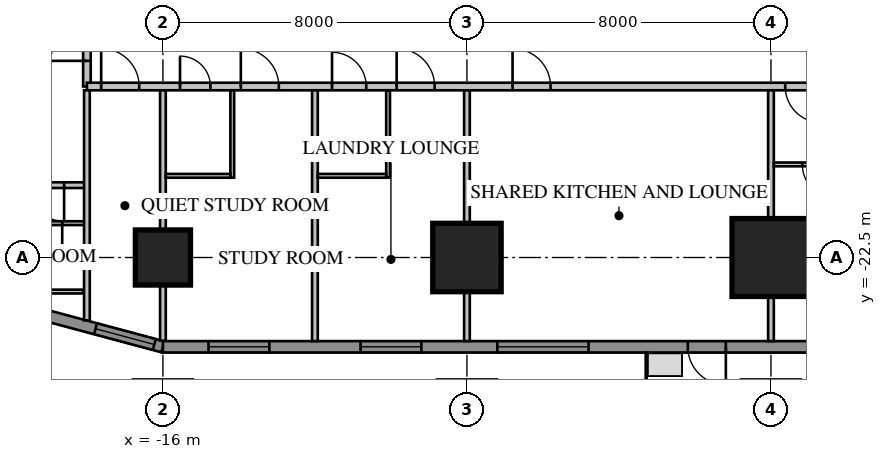
"""IFC4 building model, lengths in metres.
Left out: names, types, materials, properties, quantities, classifications, styles, units other than length and angle.
Written with IfcOpenShell. Run it as: python <this file> out.ifc"""

import sys

from ifc_helpers import new_model, si_unit, direction, frame, frame_2d, origin, origin_2d, place, context, subcontext, project, spatial, rectangle, extrude, element, fill, save


model = new_model("IFC4")
c1 = context("Model", 3, precision=1e-05, world=origin(), true_north=direction((0.0, 1.0)))
c2 = subcontext(c1, "Body", "Model", "MODEL_VIEW")
j1 = project(units=[si_unit("LENGTHUNIT", "METRE"), si_unit("PLANEANGLEUNIT", "RADIAN")], contexts=[c1])
p1 = place(None, origin())
s1 = spatial("IfcSite", under=j1, at=p1, CompositionType="ELEMENT")
p2 = place(p1, origin())
s2 = spatial("IfcBuilding", under=s1, at=p2, CompositionType="ELEMENT")
p3 = place(p2, frame((0.0, 0.0, 31.4)))
s3 = spatial("IfcBuildingStorey", under=s2, at=p3, CompositionType="ELEMENT", Elevation=31.4)
p4 = place(p3, frame((-16.0, -22.5, 0.0), z_axis=(0.0, 0.0, 1.0), x_axis=(1.0, 0.0, 0.0)))
e1 = element("IfcColumn", 1, at=p4, inside=s3, PredefinedType="COLUMN", context=c2, shape_type="SweptSolid", body=[
    extrude(rectangle(XDim=1.45, YDim=1.45, at=origin_2d()), origin(), (0.0, 0.0, 1.0), 3.85),
])
p5 = place(p3, frame((-8.0, -22.5, 0.0), z_axis=(0.0, 0.0, 1.0), x_axis=(1.0, 0.0, 0.0)))
e2 = element("IfcColumn", 2, at=p5, inside=s3, PredefinedType="COLUMN", context=c2, shape_type="SweptSolid", body=[
    extrude(rectangle(XDim=1.8, YDim=1.8, at=origin_2d()), origin(), (0.0, 0.0, 1.0), 3.85),
])
p6 = place(p3, frame((0.0, -22.5, 0.0), z_axis=(0.0, 0.0, 1.0), x_axis=(1.0, 0.0, 0.0)))
e3 = element("IfcColumn", 3, at=p6, inside=s3, PredefinedType="COLUMN", context=c2, shape_type="SweptSolid", body=[
    extrude(rectangle(XDim=2.05, YDim=2.05, at=origin_2d()), origin(), (0.0, 0.0, 1.0), 3.85),
])
p7 = place(p3, frame((-20.425, -23.664, 0.0), z_axis=(0.0, 0.0, 1.0), x_axis=(0.965920218567, -0.258839972501, 0.0)))
e4 = element("IfcWall", 4, at=p7, inside=s3, PredefinedType="SOLIDWALL", context=c2, shape_type="SweptSolid", body=[
    extrude(rectangle(XDim=4.581, YDim=0.3, at=frame_2d((2.291, 0.0))), origin(), (0.0, 0.0, 1.0), 3.65),
])
p8 = place(p7, frame((2.746, 0.0, 0.75)))
e5 = element("IfcOpeningElement", 5, at=p8, cuts=e4, PredefinedType="OPENING", context=c2, shape_type="SweptSolid", body=[
    extrude(rectangle(XDim=1.6, YDim=1.8, at=frame_2d((0.8, 0.9))), frame((0.0, 0.17, 0.0), z_axis=(0.0, -1.0, 0.0), x_axis=(1.0, 0.0, 0.0)), (0.0, 0.0, 1.0), 0.34),
])
p9 = place(p3, frame((-16.0, -24.85, 0.0), z_axis=(0.0, 0.0, 1.0), x_axis=(1.0, 0.0, 0.0)))
e6 = element("IfcWall", 6, at=p9, inside=s3, PredefinedType="SOLIDWALL", context=c2, shape_type="SweptSolid", body=[
    extrude(rectangle(XDim=32.0, YDim=0.3, at=frame_2d((16.0, 0.0))), origin(), (0.0, 0.0, 1.0), 3.65),
])
p10 = place(p9, frame((1.2, 0.0, 0.75)))
e7 = element("IfcOpeningElement", 7, at=p10, cuts=e6, PredefinedType="OPENING", context=c2, shape_type="SweptSolid", body=[
    extrude(rectangle(XDim=1.6, YDim=1.8, at=frame_2d((0.8, 0.9))), frame((0.0, 0.17, 0.0), z_axis=(0.0, -1.0, 0.0), x_axis=(1.0, 0.0, 0.0)), (0.0, 0.0, 1.0), 0.34),
])
p11 = place(p9, frame((5.2, 0.0, 0.75)))
e8 = element("IfcOpeningElement", 8, at=p11, cuts=e6, PredefinedType="OPENING", context=c2, shape_type="SweptSolid", body=[
    extrude(rectangle(XDim=1.6, YDim=1.8, at=frame_2d((0.8, 0.9))), frame((0.0, 0.17, 0.0), z_axis=(0.0, -1.0, 0.0), x_axis=(1.0, 0.0, 0.0)), (0.0, 0.0, 1.0), 0.34),
])
p12 = place(p9, frame((17.2, 0.0, 0.75)))
e9 = element("IfcOpeningElement", 9, at=p12, cuts=e6, PredefinedType="OPENING", context=c2, shape_type="SweptSolid", body=[
    extrude(rectangle(XDim=1.6, YDim=1.8, at=frame_2d((0.8, 0.9))), frame((0.0, 0.17, 0.0), z_axis=(0.0, -1.0, 0.0), x_axis=(1.0, 0.0, 0.0)), (0.0, 0.0, 1.0), 0.34),
])
p13 = place(p9, frame((21.2, 0.0, 0.75)))
e10 = element("IfcOpeningElement", 10, at=p13, cuts=e6, PredefinedType="OPENING", context=c2, shape_type="SweptSolid", body=[
    extrude(rectangle(XDim=1.6, YDim=1.8, at=frame_2d((0.8, 0.9))), frame((0.0, 0.17, 0.0), z_axis=(0.0, -1.0, 0.0), x_axis=(1.0, 0.0, 0.0)), (0.0, 0.0, 1.0), 0.34),
])
p14 = place(p9, frame((25.2, 0.0, 0.75)))
e11 = element("IfcOpeningElement", 11, at=p14, cuts=e6, PredefinedType="OPENING", context=c2, shape_type="SweptSolid", body=[
    extrude(rectangle(XDim=1.6, YDim=1.8, at=frame_2d((0.8, 0.9))), frame((0.0, 0.17, 0.0), z_axis=(0.0, -1.0, 0.0), x_axis=(1.0, 0.0, 0.0)), (0.0, 0.0, 1.0), 0.34),
])
p15 = place(p9, frame((29.2, 0.0, 0.75)))
e12 = element("IfcOpeningElement", 12, at=p15, cuts=e6, PredefinedType="OPENING", context=c2, shape_type="SweptSolid", body=[
    extrude(rectangle(XDim=1.6, YDim=1.8, at=frame_2d((0.8, 0.9))), frame((0.0, 0.17, 0.0), z_axis=(0.0, -1.0, 0.0), x_axis=(1.0, 0.0, 0.0)), (0.0, 0.0, 1.0), 0.34),
])
p16 = place(p9, frame((8.8, 0.0, 0.75)))
e13 = element("IfcOpeningElement", 13, at=p16, cuts=e6, PredefinedType="OPENING", context=c2, shape_type="SweptSolid", body=[
    extrude(rectangle(XDim=2.4, YDim=1.8, at=frame_2d((1.2, 0.9))), frame((0.0, 0.17, 0.0), z_axis=(0.0, -1.0, 0.0), x_axis=(1.0, 0.0, 0.0)), (0.0, 0.0, 1.0), 0.34),
])
p17 = place(p9, frame((13.812, 0.0, 0.0)))
e14 = element("IfcOpeningElement", 14, at=p17, cuts=e6, PredefinedType="OPENING", context=c2, shape_type="SweptSolid", body=[
    extrude(rectangle(XDim=1.0, YDim=2.4, at=frame_2d((0.5, 1.2))), frame((0.0, 0.17, 0.0), z_axis=(0.0, -1.0, 0.0), x_axis=(1.0, 0.0, 0.0)), (0.0, 0.0, 1.0), 0.34),
])
p18 = place(p3, frame((-18.0, 18.0, 0.0), z_axis=(0.0, 0.0, 1.0), x_axis=(0.0, -1.0, 0.0)))
e15 = element("IfcWall", 15, at=p18, inside=s3, PredefinedType="PARTITIONING", context=c2, shape_type="SweptSolid", body=[
    extrude(rectangle(XDim=36.0, YDim=0.2, at=frame_2d((18.0, 0.0))), origin(), (0.0, 0.0, 1.0), 3.65),
])
p19 = place(p18, frame((10.4, 0.0, 0.0)))
e16 = element("IfcOpeningElement", 16, at=p19, cuts=e15, PredefinedType="OPENING", context=c2, shape_type="SweptSolid", body=[
    extrude(rectangle(XDim=1.0, YDim=2.1, at=frame_2d((0.5, 1.05))), frame((0.0, 0.12, 0.0), z_axis=(0.0, -1.0, 0.0), x_axis=(1.0, 0.0, 0.0)), (0.0, 0.0, 1.0), 0.24),
])
p20 = place(p18, frame((0.375, 0.0, 0.0)))
e17 = element("IfcOpeningElement", 17, at=p20, cuts=e15, PredefinedType="OPENING", context=c2, shape_type="SweptSolid", body=[
    extrude(rectangle(XDim=1.0, YDim=2.1, at=frame_2d((0.5, 1.05))), frame((0.0, 0.12, 0.0), z_axis=(0.0, -1.0, 0.0), x_axis=(1.0, 0.0, 0.0)), (0.0, 0.0, 1.0), 0.24),
])
p21 = place(p18, frame((34.375, 0.0, 0.0)))
e18 = element("IfcOpeningElement", 18, at=p21, cuts=e15, PredefinedType="OPENING", context=c2, shape_type="SweptSolid", body=[
    extrude(rectangle(XDim=0.95, YDim=2.1, at=frame_2d((0.475, 1.05))), frame((0.0, 0.12, 0.0), z_axis=(0.0, -1.0, 0.0), x_axis=(1.0, 0.0, 0.0)), (0.0, 0.0, 1.0), 0.24),
])
p22 = place(p3, frame((-18.065, -21.596, 0.0), z_axis=(0.0, 0.0, 1.0), x_axis=(-1.0, 0.0, 0.0)))
e19 = element("IfcWall", 19, at=p22, inside=s3, PredefinedType="PARTITIONING", context=c2, shape_type="SweptSolid", body=[
    extrude(rectangle(XDim=2.335, YDim=0.1, at=frame_2d((1.167, 0.0))), origin(), (0.0, 0.0, 1.0), 3.65),
])
p23 = place(p22, frame((0.585, 0.0, 0.0)))
e20 = element("IfcOpeningElement", 20, at=p23, cuts=e19, PredefinedType="OPENING", context=c2, shape_type="SweptSolid", body=[
    extrude(rectangle(XDim=0.8, YDim=2.1, at=frame_2d((0.4, 1.05))), frame((0.0, 0.07, 0.0), z_axis=(0.0, -1.0, 0.0), x_axis=(1.0, 0.0, 0.0)), (0.0, 0.0, 1.0), 0.14),
])
p24 = place(p3, frame((-18.1, -23.396, 0.0), z_axis=(0.0, 0.0, 1.0), x_axis=(-1.0, 0.0, 0.0)))
e21 = element("IfcWall", 21, at=p24, inside=s3, PredefinedType="PARTITIONING", context=c2, shape_type="SweptSolid", body=[
    extrude(rectangle(XDim=2.3, YDim=0.1, at=frame_2d((1.15, 0.0))), origin(), (0.0, 0.0, 1.0), 3.65),
])
p25 = place(p3, frame((-18.065, -20.596, 0.0), z_axis=(0.0, 0.0, 1.0), x_axis=(-1.0, 0.0, 0.0)))
e22 = element("IfcWall", 22, at=p25, inside=s3, PredefinedType="PARTITIONING", context=c2, shape_type="SweptSolid", body=[
    extrude(rectangle(XDim=5.209, YDim=0.15, at=frame_2d((2.604, 0.0))), origin(), (0.0, 0.0, 1.0), 3.65),
])
p26 = place(p25, frame((0.535, 0.0, 0.0)))
e23 = element("IfcOpeningElement", 23, at=p26, cuts=e22, PredefinedType="OPENING", context=c2, shape_type="SweptSolid", body=[
    extrude(rectangle(XDim=0.95, YDim=2.1, at=frame_2d((0.475, 1.05))), frame((0.0, 0.095, 0.0), z_axis=(0.0, -1.0, 0.0), x_axis=(1.0, 0.0, 0.0)), (0.0, 0.0, 1.0), 0.19),
])
p27 = place(p3, frame((-18.0, -18.0, 0.0), z_axis=(0.0, 0.0, 1.0), x_axis=(1.0, 0.0, 0.0)))
e24 = element("IfcWall", 24, at=p27, inside=s3, PredefinedType="PARTITIONING", context=c2, shape_type="SweptSolid", body=[
    extrude(rectangle(XDim=36.0, YDim=0.2, at=frame_2d((18.0, 0.0))), origin(), (0.0, 0.0, 1.0), 3.65),
])
p28 = place(p27, frame((0.375, 0.0, 0.0)))
e25 = element("IfcOpeningElement", 25, at=p28, cuts=e24, PredefinedType="OPENING", context=c2, shape_type="SweptSolid", body=[
    extrude(rectangle(XDim=1.0, YDim=2.1, at=frame_2d((0.5, 1.05))), frame((0.0, 0.12, 0.0), z_axis=(0.0, -1.0, 0.0), x_axis=(1.0, 0.0, 0.0)), (0.0, 0.0, 1.0), 0.24),
])
p29 = place(p27, frame((2.45, 0.0, 0.0)))
e26 = element("IfcOpeningElement", 26, at=p29, cuts=e24, PredefinedType="OPENING", context=c2, shape_type="SweptSolid", body=[
    extrude(rectangle(XDim=0.8, YDim=2.1, at=frame_2d((0.4, 1.05))), frame((0.0, 0.12, 0.0), z_axis=(0.0, -1.0, 0.0), x_axis=(1.0, 0.0, 0.0)), (0.0, 0.0, 1.0), 0.24),
])
p30 = place(p27, frame((4.05, 0.0, 0.0)))
e27 = element("IfcOpeningElement", 27, at=p30, cuts=e24, PredefinedType="OPENING", context=c2, shape_type="SweptSolid", body=[
    extrude(rectangle(XDim=1.0, YDim=2.1, at=frame_2d((0.5, 1.05))), frame((0.0, 0.12, 0.0), z_axis=(0.0, -1.0, 0.0), x_axis=(1.0, 0.0, 0.0)), (0.0, 0.0, 1.0), 0.24),
])
p31 = place(p27, frame((6.45, 0.0, 0.0)))
e28 = element("IfcOpeningElement", 28, at=p31, cuts=e24, PredefinedType="OPENING", context=c2, shape_type="SweptSolid", body=[
    extrude(rectangle(XDim=0.9, YDim=2.1, at=frame_2d((0.45, 1.05))), frame((0.0, 0.12, 0.0), z_axis=(0.0, -1.0, 0.0), x_axis=(1.0, 0.0, 0.0)), (0.0, 0.0, 1.0), 0.24),
])
p32 = place(p27, frame((8.15, 0.0, 0.0)))
e29 = element("IfcOpeningElement", 29, at=p32, cuts=e24, PredefinedType="OPENING", context=c2, shape_type="SweptSolid", body=[
    extrude(rectangle(XDim=1.0, YDim=2.1, at=frame_2d((0.5, 1.05))), frame((0.0, 0.12, 0.0), z_axis=(0.0, -1.0, 0.0), x_axis=(1.0, 0.0, 0.0)), (0.0, 0.0, 1.0), 0.24),
])
p33 = place(p27, frame((18.375, 0.0, 0.0)))
e30 = element("IfcOpeningElement", 30, at=p33, cuts=e24, PredefinedType="OPENING", context=c2, shape_type="SweptSolid", body=[
    extrude(rectangle(XDim=0.95, YDim=2.1, at=frame_2d((0.475, 1.05))), frame((0.0, 0.12, 0.0), z_axis=(0.0, -1.0, 0.0), x_axis=(1.0, 0.0, 0.0)), (0.0, 0.0, 1.0), 0.24),
])
p34 = place(p27, frame((24.25, 0.0, 0.0)))
e31 = element("IfcOpeningElement", 31, at=p34, cuts=e24, PredefinedType="OPENING", context=c2, shape_type="SweptSolid", body=[
    extrude(rectangle(XDim=0.95, YDim=2.1, at=frame_2d((0.475, 1.05))), frame((0.0, 0.12, 0.0), z_axis=(0.0, -1.0, 0.0), x_axis=(1.0, 0.0, 0.0)), (0.0, 0.0, 1.0), 0.24),
])
p35 = place(p27, frame((26.375, 0.0, 0.0)))
e32 = element("IfcOpeningElement", 32, at=p35, cuts=e24, PredefinedType="OPENING", context=c2, shape_type="SweptSolid", body=[
    extrude(rectangle(XDim=0.95, YDim=2.1, at=frame_2d((0.475, 1.05))), frame((0.0, 0.12, 0.0), z_axis=(0.0, -1.0, 0.0), x_axis=(1.0, 0.0, 0.0)), (0.0, 0.0, 1.0), 0.24),
])
p36 = place(p27, frame((32.25, 0.0, 0.0)))
e33 = element("IfcOpeningElement", 33, at=p36, cuts=e24, PredefinedType="OPENING", context=c2, shape_type="SweptSolid", body=[
    extrude(rectangle(XDim=0.95, YDim=2.1, at=frame_2d((0.475, 1.05))), frame((0.0, 0.12, 0.0), z_axis=(0.0, -1.0, 0.0), x_axis=(1.0, 0.0, 0.0)), (0.0, 0.0, 1.0), 0.24),
])
p37 = place(p27, frame((34.375, 0.0, 0.0)))
e34 = element("IfcOpeningElement", 34, at=p37, cuts=e24, PredefinedType="OPENING", context=c2, shape_type="SweptSolid", body=[
    extrude(rectangle(XDim=0.95, YDim=2.1, at=frame_2d((0.475, 1.05))), frame((0.0, 0.12, 0.0), z_axis=(0.0, -1.0, 0.0), x_axis=(1.0, 0.0, 0.0)), (0.0, 0.0, 1.0), 0.24),
])
p38 = place(p27, frame((11.2, 0.0, 0.0)))
e35 = element("IfcOpeningElement", 35, at=p38, cuts=e24, PredefinedType="OPENING", context=c2, shape_type="SweptSolid", body=[
    extrude(rectangle(XDim=1.0, YDim=2.1, at=frame_2d((0.5, 1.05))), frame((0.0, 0.12, 0.0), z_axis=(0.0, -1.0, 0.0), x_axis=(1.0, 0.0, 0.0)), (0.0, 0.0, 1.0), 0.24),
])
p39 = place(p3, frame((-18.0, -18.1, 0.0), z_axis=(0.0, 0.0, 1.0), x_axis=(0.0, -1.0, 0.0)))
e36 = element("IfcWall", 36, at=p39, inside=s3, PredefinedType="PARTITIONING", context=c2, shape_type="SweptSolid", body=[
    extrude(rectangle(XDim=6.053, YDim=0.15, at=frame_2d((3.027, 0.0))), origin(), (0.0, 0.0, 1.0), 3.65),
])
p40 = place(p3, frame((-16.0, -18.1, 0.0), z_axis=(0.0, 0.0, 1.0), x_axis=(0.0, -1.0, 0.0)))
e37 = element("IfcWall", 37, at=p40, inside=s3, PredefinedType="PARTITIONING", context=c2, shape_type="SweptSolid", body=[
    extrude(rectangle(XDim=6.589, YDim=0.15, at=frame_2d((3.295, 0.0))), origin(), (0.0, 0.0, 1.0), 3.65),
])
for number, where, z_axis, x_axis in (
    (38, (-12.0, -18.1, 0.0), (0.0, 0.0, 1.0), (0.0, -1.0, 0.0)),
    (39, (-8.0, -18.1, 0.0), (0.0, 0.0, 1.0), (0.0, -1.0, 0.0)),
):
    element("IfcWall", number, at=place(p3, frame(where, z_axis=z_axis, x_axis=x_axis)), inside=s3, PredefinedType="PARTITIONING", context=c2, shape_type="SweptSolid", body=[
        extrude(rectangle(XDim=6.6, YDim=0.15, at=frame_2d((3.3, 0.0))), origin(), (0.0, 0.0, 1.0), 3.65),
    ])
p41 = place(p3, frame((0.0, -18.1, 0.0), z_axis=(0.0, 0.0, 1.0), x_axis=(0.0, -1.0, 0.0)))
e40 = element("IfcWall", 40, at=p41, inside=s3, PredefinedType="PARTITIONING", context=c2, shape_type="SweptSolid", body=[
    extrude(rectangle(XDim=6.6, YDim=0.15, at=frame_2d((3.3, 0.0))), origin(), (0.0, 0.0, 1.0), 2.809),
])
p42 = place(p3, frame((-14.175, -18.1, 0.0), z_axis=(0.0, 0.0, 1.0), x_axis=(0.0, -1.0, 0.0)))
e41 = element("IfcWall", 41, at=p42, inside=s3, PredefinedType="PARTITIONING", context=c2, shape_type="SweptSolid", body=[
    extrude(rectangle(XDim=2.3, YDim=0.1, at=frame_2d((1.15, 0.0))), origin(), (0.0, 0.0, 1.0), 3.65),
])
p43 = place(p3, frame((-15.925, -20.35, 0.0), z_axis=(0.0, 0.0, 1.0), x_axis=(1.0, 0.0, 0.0)))
e42 = element("IfcWall", 42, at=p43, inside=s3, PredefinedType="PARTITIONING", context=c2, shape_type="SweptSolid", body=[
    extrude(rectangle(XDim=1.7, YDim=0.1, at=frame_2d((0.85, 0.0))), origin(), (0.0, 0.0, 1.0), 3.65),
])
p44 = place(p3, frame((-10.075, -18.1, 0.0), z_axis=(0.0, 0.0, 1.0), x_axis=(0.0, -1.0, 0.0)))
e43 = element("IfcWall", 43, at=p44, inside=s3, PredefinedType="PARTITIONING", context=c2, shape_type="SweptSolid", body=[
    extrude(rectangle(XDim=2.3, YDim=0.1, at=frame_2d((1.15, 0.0))), origin(), (0.0, 0.0, 1.0), 3.65),
])
p45 = place(p3, frame((-11.925, -20.35, 0.0), z_axis=(0.0, 0.0, 1.0), x_axis=(1.0, 0.0, 0.0)))
e44 = element("IfcWall", 44, at=p45, inside=s3, PredefinedType="PARTITIONING", context=c2, shape_type="SweptSolid", body=[
    extrude(rectangle(XDim=1.8, YDim=0.1, at=frame_2d((0.9, 0.0))), origin(), (0.0, 0.0, 1.0), 3.65),
])
p46 = place(p3, frame((0.075, -20.05, 0.0), z_axis=(0.0, 0.0, 1.0), x_axis=(1.0, 0.0, 0.0)))
e45 = element("IfcWall", 45, at=p46, inside=s3, PredefinedType="PARTITIONING", context=c2, shape_type="SweptSolid", body=[
    extrude(rectangle(XDim=1.85, YDim=0.1, at=frame_2d((0.925, 0.0))), origin(), (0.0, 0.0, 1.0), 3.65),
])
p47 = place(p46, frame((0.75, 0.0, 0.0)))
e46 = element("IfcOpeningElement", 46, at=p47, cuts=e45, PredefinedType="OPENING", context=c2, shape_type="SweptSolid", body=[
    extrude(rectangle(XDim=0.9, YDim=2.1, at=frame_2d((0.45, 1.05))), frame((0.0, 0.07, 0.0), z_axis=(0.0, -1.0, 0.0), x_axis=(1.0, 0.0, 0.0)), (0.0, 0.0, 1.0), 0.14),
])
p48 = place(p8, origin())
e47 = element("IfcWindow", 47, at=p48, inside=s3, PartitioningType="SINGLE_PANEL", PredefinedType="WINDOW", context=c2, shape_type="SweptSolid", body=[
    extrude(rectangle(XDim=1.6, YDim=1.8, at=frame_2d((0.8, 0.9))), frame((0.0, 0.03, 0.0), z_axis=(0.0, -1.0, 0.0), x_axis=(1.0, 0.0, 0.0)), (0.0, 0.0, 1.0), 0.06),
])
fill(e5, e47)
p49 = place(p10, origin())
e48 = element("IfcWindow", 48, at=p49, inside=s3, PartitioningType="SINGLE_PANEL", PredefinedType="WINDOW", context=c2, shape_type="SweptSolid", body=[
    extrude(rectangle(XDim=1.6, YDim=1.8, at=frame_2d((0.8, 0.9))), frame((0.0, 0.03, 0.0), z_axis=(0.0, -1.0, 0.0), x_axis=(1.0, 0.0, 0.0)), (0.0, 0.0, 1.0), 0.06),
])
fill(e7, e48)
p50 = place(p11, origin())
e49 = element("IfcWindow", 49, at=p50, inside=s3, PartitioningType="SINGLE_PANEL", PredefinedType="WINDOW", context=c2, shape_type="SweptSolid", body=[
    extrude(rectangle(XDim=1.6, YDim=1.8, at=frame_2d((0.8, 0.9))), frame((0.0, 0.03, 0.0), z_axis=(0.0, -1.0, 0.0), x_axis=(1.0, 0.0, 0.0)), (0.0, 0.0, 1.0), 0.06),
])
fill(e8, e49)
p51 = place(p16, origin())
e50 = element("IfcWindow", 50, at=p51, inside=s3, PartitioningType="SINGLE_PANEL", PredefinedType="WINDOW", context=c2, shape_type="SweptSolid", body=[
    extrude(rectangle(XDim=2.4, YDim=1.8, at=frame_2d((1.2, 0.9))), frame((0.0, 0.03, 0.0), z_axis=(0.0, -1.0, 0.0), x_axis=(1.0, 0.0, 0.0)), (0.0, 0.0, 1.0), 0.06),
])
fill(e13, e50)
p52 = place(p17, origin())
e51 = element("IfcDoor", 51, at=p52, inside=s3, OperationType="SINGLE_SWING_RIGHT", PredefinedType="DOOR", context=c2, shape_type="SweptSolid", body=[
    extrude(rectangle(XDim=1.0, YDim=2.4, at=frame_2d((0.5, 1.2))), frame((0.0, 0.025, 0.0), z_axis=(0.0, -1.0, 0.0), x_axis=(1.0, 0.0, 0.0)), (0.0, 0.0, 1.0), 0.05),
])
fill(e14, e51)
p53 = place(p21, origin())
e52 = element("IfcDoor", 52, at=p53, inside=s3, OperationType="SINGLE_SWING_RIGHT", PredefinedType="DOOR", context=c2, shape_type="SweptSolid", body=[
    extrude(rectangle(XDim=0.95, YDim=2.1, at=frame_2d((0.475, 1.05))), frame((0.0, 0.025, 0.0), z_axis=(0.0, -1.0, 0.0), x_axis=(1.0, 0.0, 0.0)), (0.0, 0.0, 1.0), 0.05),
])
fill(e18, e52)
p54 = place(p23, origin())
e53 = element("IfcDoor", 53, at=p54, inside=s3, OperationType="SINGLE_SWING_LEFT", PredefinedType="DOOR", context=c2, shape_type="SweptSolid", body=[
    extrude(rectangle(XDim=0.8, YDim=2.1, at=frame_2d((0.4, 1.05))), frame((0.0, 0.025, 0.0), z_axis=(0.0, -1.0, 0.0), x_axis=(1.0, 0.0, 0.0)), (0.0, 0.0, 1.0), 0.05),
])
fill(e20, e53)
p55 = place(p26, origin())
e54 = element("IfcDoor", 54, at=p55, inside=s3, OperationType="SINGLE_SWING_LEFT", PredefinedType="DOOR", context=c2, shape_type="SweptSolid", body=[
    extrude(rectangle(XDim=0.95, YDim=2.1, at=frame_2d((0.475, 1.05))), frame((0.0, 0.025, 0.0), z_axis=(0.0, -1.0, 0.0), x_axis=(1.0, 0.0, 0.0)), (0.0, 0.0, 1.0), 0.05),
])
fill(e23, e54)
p56 = place(p28, origin())
e55 = element("IfcDoor", 55, at=p56, inside=s3, OperationType="SINGLE_SWING_LEFT", PredefinedType="DOOR", context=c2, shape_type="SweptSolid", body=[
    extrude(rectangle(XDim=1.0, YDim=2.1, at=frame_2d((0.5, 1.05))), frame((0.0, 0.025, 0.0), z_axis=(0.0, -1.0, 0.0), x_axis=(1.0, 0.0, 0.0)), (0.0, 0.0, 1.0), 0.05),
])
fill(e25, e55)
p57 = place(p29, origin())
e56 = element("IfcDoor", 56, at=p57, inside=s3, OperationType="SINGLE_SWING_LEFT", PredefinedType="DOOR", context=c2, shape_type="SweptSolid", body=[
    extrude(rectangle(XDim=0.8, YDim=2.1, at=frame_2d((0.4, 1.05))), frame((0.0, 0.025, 0.0), z_axis=(0.0, -1.0, 0.0), x_axis=(1.0, 0.0, 0.0)), (0.0, 0.0, 1.0), 0.05),
])
fill(e26, e56)
p58 = place(p30, origin())
e57 = element("IfcDoor", 57, at=p58, inside=s3, OperationType="SINGLE_SWING_LEFT", PredefinedType="DOOR", context=c2, shape_type="SweptSolid", body=[
    extrude(rectangle(XDim=1.0, YDim=2.1, at=frame_2d((0.5, 1.05))), frame((0.0, 0.025, 0.0), z_axis=(0.0, -1.0, 0.0), x_axis=(1.0, 0.0, 0.0)), (0.0, 0.0, 1.0), 0.05),
])
fill(e27, e57)
p59 = place(p31, origin())
e58 = element("IfcDoor", 58, at=p59, inside=s3, OperationType="SINGLE_SWING_LEFT", PredefinedType="DOOR", context=c2, shape_type="SweptSolid", body=[
    extrude(rectangle(XDim=0.9, YDim=2.1, at=frame_2d((0.45, 1.05))), frame((0.0, 0.025, 0.0), z_axis=(0.0, -1.0, 0.0), x_axis=(1.0, 0.0, 0.0)), (0.0, 0.0, 1.0), 0.05),
])
fill(e28, e58)
p60 = place(p32, origin())
e59 = element("IfcDoor", 59, at=p60, inside=s3, OperationType="SINGLE_SWING_LEFT", PredefinedType="DOOR", context=c2, shape_type="SweptSolid", body=[
    extrude(rectangle(XDim=1.0, YDim=2.1, at=frame_2d((0.5, 1.05))), frame((0.0, 0.025, 0.0), z_axis=(0.0, -1.0, 0.0), x_axis=(1.0, 0.0, 0.0)), (0.0, 0.0, 1.0), 0.05),
])
fill(e29, e59)
p61 = place(p33, origin())
e60 = element("IfcDoor", 60, at=p61, inside=s3, OperationType="SINGLE_SWING_RIGHT", PredefinedType="DOOR", context=c2, shape_type="SweptSolid", body=[
    extrude(rectangle(XDim=0.95, YDim=2.1, at=frame_2d((0.475, 1.05))), frame((0.0, 0.025, 0.0), z_axis=(0.0, -1.0, 0.0), x_axis=(1.0, 0.0, 0.0)), (0.0, 0.0, 1.0), 0.05),
])
fill(e30, e60)
p62 = place(p38, origin())
e61 = element("IfcDoor", 61, at=p62, inside=s3, OperationType="SINGLE_SWING_LEFT", PredefinedType="DOOR", context=c2, shape_type="SweptSolid", body=[
    extrude(rectangle(XDim=1.0, YDim=2.1, at=frame_2d((0.5, 1.05))), frame((0.0, 0.025, 0.0), z_axis=(0.0, -1.0, 0.0), x_axis=(1.0, 0.0, 0.0)), (0.0, 0.0, 1.0), 0.05),
])
fill(e35, e61)
p63 = place(p47, origin())
e62 = element("IfcDoor", 62, at=p63, inside=s3, OperationType="SINGLE_SWING_RIGHT", PredefinedType="DOOR", context=c2, shape_type="SweptSolid", body=[
    extrude(rectangle(XDim=0.9, YDim=2.1, at=frame_2d((0.45, 1.05))), frame((0.0, 0.025, 0.0), z_axis=(0.0, -1.0, 0.0), x_axis=(1.0, 0.0, 0.0)), (0.0, 0.0, 1.0), 0.05),
])
fill(e46, e62)
save(model, sys.argv[1])
